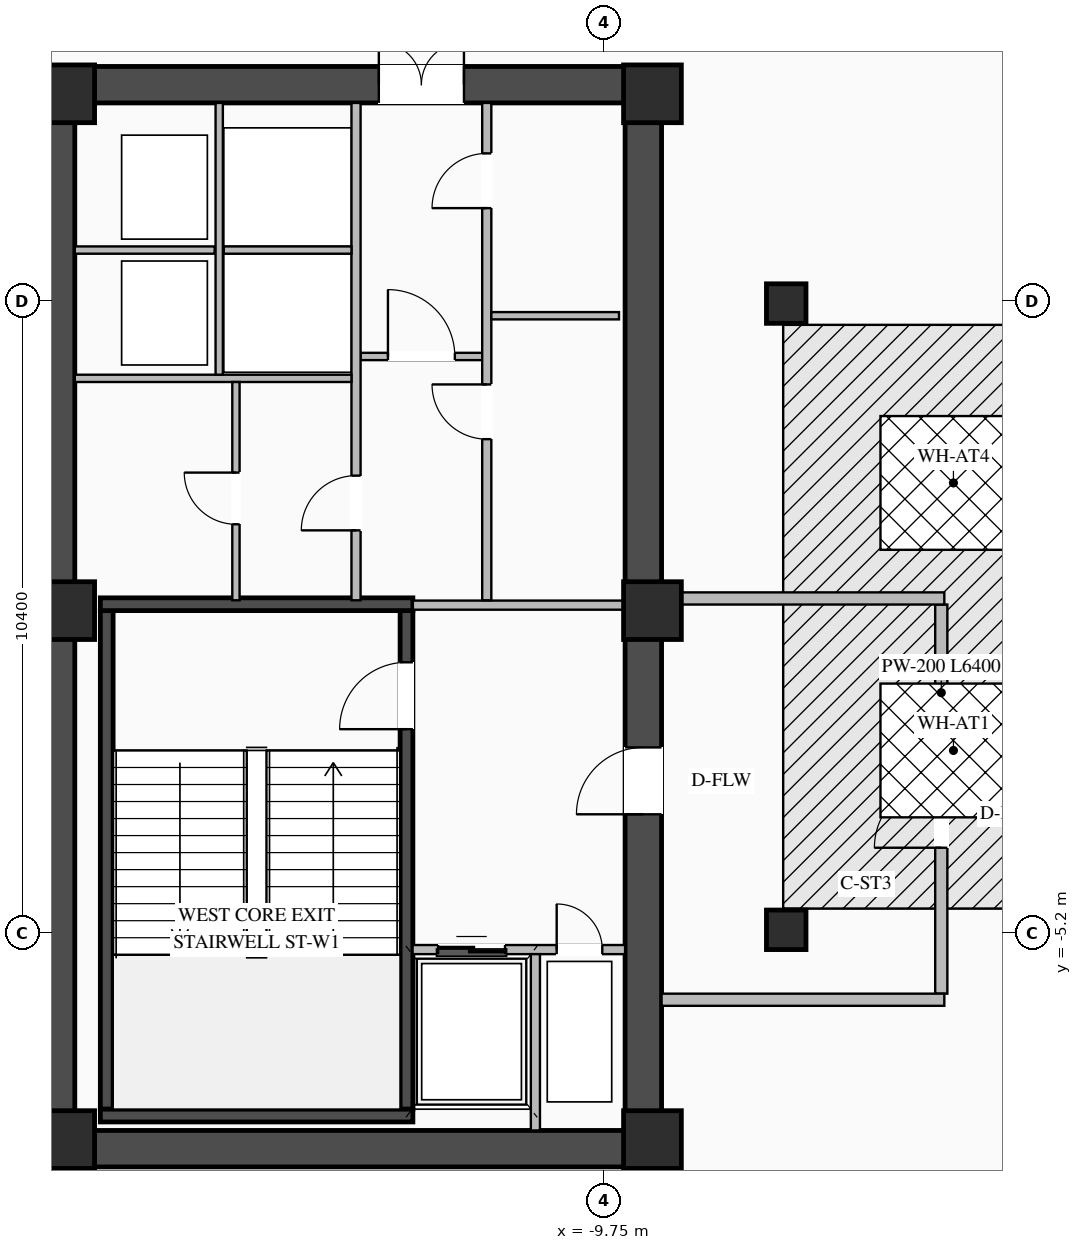
"""IFC4 building model, lengths in metres.
Left out: names, types, materials, properties, quantities, classifications, styles, units other than length and angle.
Written with IfcOpenShell. Run it as: python <this file> out.ifc"""

import sys

from ifc_helpers import new_model, si_unit, direction, frame, frame_2d, origin, origin_2d, place, context, subcontext, project, spatial, rectangle, i_section, extrude, element, fill, save


model = new_model("IFC4")
c1 = context("Model", 3, precision=1e-05, world=origin(), true_north=direction((0.0, 1.0)))
c2 = subcontext(c1, "Body", "Model", "MODEL_VIEW")
j1 = project(units=[si_unit("LENGTHUNIT", "METRE"), si_unit("PLANEANGLEUNIT", "RADIAN")], contexts=[c1])
p1 = place(None, origin())
s1 = spatial("IfcSite", under=j1, at=p1, CompositionType="ELEMENT")
p2 = place(p1, origin())
s2 = spatial("IfcBuilding", under=s1, at=p2, CompositionType="ELEMENT")
p3 = place(p2, frame((0.0, 0.0, 194.9)))
s3 = spatial("IfcBuildingStorey", under=s2, at=p3, CompositionType="ELEMENT", Elevation=194.9)
p4 = place(p3, frame((-19.05, -8.75, 0.0), z_axis=(0.0, 0.0, 1.0), x_axis=(1.0, 0.0, 0.0)))
e1 = element("IfcWall", 1, at=p4, inside=s3, PredefinedType="SHEAR", context=c2, shape_type="SweptSolid", body=[
    extrude(rectangle(XDim=10.25, YDim=0.6, at=frame_2d((5.125, 0.0))), origin(), (0.0, 0.0, 1.0), 4.32),
])
p5 = place(p3, frame((-19.05, 8.75, 0.0), z_axis=(0.0, 0.0, 1.0), x_axis=(1.0, 0.0, 0.0)))
e2 = element("IfcWall", 2, at=p5, inside=s3, PredefinedType="SHEAR", context=c2, shape_type="SweptSolid", body=[
    extrude(rectangle(XDim=10.25, YDim=0.6, at=frame_2d((5.125, 0.0))), origin(), (0.0, 0.0, 1.0), 4.32),
])
p6 = place(p5, frame((5.6, 0.0, 0.0)))
e3 = element("IfcOpeningElement", 3, at=p6, cuts=e2, PredefinedType="OPENING", context=c2, shape_type="SweptSolid", body=[
    extrude(rectangle(XDim=1.4, YDim=2.05, at=frame_2d((0.7, 1.025))), frame((0.0, 0.31, 0.0), z_axis=(0.0, -1.0, 0.0), x_axis=(1.0, 0.0, 0.0)), (0.0, 0.0, 1.0), 0.62),
])
p7 = place(p3, frame((-18.75, -8.45, 0.0), z_axis=(0.0, 0.0, 1.0), x_axis=(0.0, 1.0, 0.0)))
e4 = element("IfcWall", 4, at=p7, inside=s3, PredefinedType="SHEAR", context=c2, shape_type="SweptSolid", body=[
    extrude(rectangle(XDim=16.9, YDim=0.6, at=frame_2d((8.45, 0.0))), origin(), (0.0, 0.0, 1.0), 4.32),
])
p8 = place(p3, frame((-9.1, -8.45, 0.0), z_axis=(0.0, 0.0, 1.0), x_axis=(0.0, 1.0, 0.0)))
e5 = element("IfcWall", 5, at=p8, inside=s3, PredefinedType="SHEAR", context=c2, shape_type="SweptSolid", body=[
    extrude(rectangle(XDim=16.9, YDim=0.6, at=frame_2d((8.45, 0.0))), origin(), (0.0, 0.0, 1.0), 4.32),
])
p9 = place(p8, frame((5.2, 0.0, 0.0)))
e6 = element("IfcOpeningElement", 6, at=p9, cuts=e5, PredefinedType="OPENING", context=c2, shape_type="SweptSolid", body=[
    extrude(rectangle(XDim=1.1, YDim=2.08, at=frame_2d((0.55, 1.04))), frame((0.0, 0.31, 0.0), z_axis=(0.0, -1.0, 0.0), x_axis=(1.0, 0.0, 0.0)), (0.0, 0.0, 1.0), 0.62),
])
p10 = place(p3, frame((-12.995, -8.1, 0.0), z_axis=(0.0, 0.0, 1.0), x_axis=(0.0, 1.0, 0.0)))
e7 = element("IfcWall", 7, at=p10, inside=s3, PredefinedType="SHEAR", context=c2, shape_type="SweptSolid", body=[
    extrude(rectangle(XDim=8.2, YDim=0.21, at=frame_2d((4.1, 0.0))), origin(), (0.0, 0.0, 1.0), 4.32),
])
p11 = place(p10, frame((6.25, 0.0, 0.0)))
e8 = element("IfcOpeningElement", 8, at=p11, cuts=e7, PredefinedType="OPENING", context=c2, shape_type="SweptSolid", body=[
    extrude(rectangle(XDim=1.1, YDim=2.15, at=frame_2d((0.55, 1.075))), frame((0.0, 0.115, 0.0), z_axis=(0.0, -1.0, 0.0), x_axis=(1.0, 0.0, 0.0)), (0.0, 0.0, 1.0), 0.23),
])
p12 = place(p3, frame((-17.925, -8.1, 0.0), z_axis=(0.0, 0.0, 1.0), x_axis=(0.0, 1.0, 0.0)))
e9 = element("IfcWall", 9, at=p12, inside=s3, PredefinedType="SHEAR", context=c2, shape_type="SweptSolid", body=[
    extrude(rectangle(XDim=8.2, YDim=0.21, at=frame_2d((4.1, 0.0))), origin(), (0.0, 0.0, 1.0), 4.32),
])
for number, where, z_axis, x_axis in (
    (10, (-18.03, -8.205, 0.0), (0.0, 0.0, 1.0), (1.0, 0.0, 0.0)),
    (11, (-12.89, 0.205, 0.0), (0.0, 0.0, 1.0), (-1.0, 0.0, 0.0)),
):
    element("IfcWall", number, at=place(p3, frame(where, z_axis=z_axis, x_axis=x_axis)), inside=s3, PredefinedType="SHEAR", context=c2, shape_type="SweptSolid", body=[
        extrude(rectangle(XDim=5.14, YDim=0.21, at=frame_2d((2.57, 0.0))), origin(), (0.0, 0.0, 1.0), 4.32),
    ])
for number, where, z_axis, x_axis in (
    (12, (-8.95, -8.6, 0.0), (0.0, 0.0, 1.0), (1.0, 0.0, 0.0)),
    (13, (-8.95, 0.1, 0.0), (0.0, 0.0, 1.0), (1.0, 0.0, 0.0)),
    (14, (-8.95, 8.6, 0.0), (0.0, 0.0, 1.0), (1.0, 0.0, 0.0)),
    (15, (-18.6, -8.6, 0.0), (0.0, 0.0, 1.0), (1.0, 0.0, 0.0)),
    (16, (-18.6, 0.1, 0.0), (0.0, 0.0, 1.0), (1.0, 0.0, 0.0)),
    (17, (-18.6, 8.6, 0.0), (0.0, 0.0, 1.0), (1.0, 0.0, 0.0)),
):
    element("IfcColumn", number, at=place(p3, frame(where, z_axis=z_axis, x_axis=x_axis)), inside=s3, PredefinedType="COLUMN", context=c2, shape_type="SweptSolid", body=[
        extrude(rectangle(XDim=0.95, YDim=0.95, at=origin_2d()), origin(), (0.0, 0.0, 1.0), 4.6),
    ])
for number, where, z_axis, x_axis in (
    (18, (-6.75, -5.15, 0.0), (0.0, 0.0, 1.0), (1.0, 0.0, 0.0)),
    (19, (-6.75, 5.15, 0.0), (0.0, 0.0, 1.0), (1.0, 0.0, 0.0)),
):
    element("IfcColumn", number, at=place(p3, frame(where, z_axis=z_axis, x_axis=x_axis)), inside=s3, PredefinedType="COLUMN", context=c2, shape_type="SweptSolid", body=[
        extrude(i_section(OverallWidth=0.65, OverallDepth=0.65, WebThickness=0.028, FlangeThickness=0.04, at=origin_2d()), origin(), (0.0, 0.0, 1.0), 4.6),
    ])
p13 = place(p3, frame((-12.895, -5.475, 0.0), z_axis=(0.0, 0.0, 1.0), x_axis=(1.0, 0.0, 0.0)))
e20 = element("IfcWall", 20, at=p13, inside=s3, PredefinedType="STANDARD", context=c2, shape_type="SweptSolid", body=[
    extrude(rectangle(XDim=3.495, YDim=0.15, at=frame_2d((1.748, 0.0))), origin(), (0.0, 0.0, 1.0), 4.3),
])
p14 = place(p13, frame((0.42, 0.0, 0.0)))
e21 = element("IfcOpeningElement", 21, at=p14, cuts=e20, PredefinedType="OPENING", context=c2, shape_type="SweptSolid", body=[
    extrude(rectangle(XDim=1.1, YDim=2.15, at=frame_2d((0.55, 1.075))), frame((0.0, 0.085, 0.0), z_axis=(0.0, -1.0, 0.0), x_axis=(1.0, 0.0, 0.0)), (0.0, 0.0, 1.0), 0.17),
])
p15 = place(p13, frame((2.37, 0.0, 0.0)))
e22 = element("IfcOpeningElement", 22, at=p15, cuts=e20, PredefinedType="OPENING", context=c2, shape_type="SweptSolid", body=[
    extrude(rectangle(XDim=0.75, YDim=2.05, at=frame_2d((0.375, 1.025))), frame((0.0, 0.085, 0.0), z_axis=(0.0, -1.0, 0.0), x_axis=(1.0, 0.0, 0.0)), (0.0, 0.0, 1.0), 0.17),
])
p16 = place(p3, frame((-10.875, -8.45, 0.0), z_axis=(0.0, 0.0, 1.0), x_axis=(0.0, 1.0, 0.0)))
e23 = element("IfcWall", 23, at=p16, inside=s3, PredefinedType="STANDARD", context=c2, shape_type="SweptSolid", body=[
    extrude(rectangle(XDim=2.9, YDim=0.15, at=frame_2d((1.45, 0.0))), origin(), (0.0, 0.0, 1.0), 4.3),
])
p17 = place(p3, frame((-12.89, 0.19, 0.0), z_axis=(0.0, 0.0, 1.0), x_axis=(1.0, 0.0, 0.0)))
e24 = element("IfcWall", 24, at=p17, inside=s3, PredefinedType="STANDARD", context=c2, shape_type="SweptSolid", body=[
    extrude(rectangle(XDim=3.49, YDim=0.15, at=frame_2d((1.745, 0.0))), origin(), (0.0, 0.0, 1.0), 3.695),
])
p18 = place(p3, frame((-13.75, 4.28, 0.0), z_axis=(0.0, 0.0, 1.0), x_axis=(1.0, 0.0, 0.0)))
e25 = element("IfcWall", 25, at=p18, inside=s3, PredefinedType="STANDARD", context=c2, shape_type="SweptSolid", body=[
    extrude(rectangle(XDim=2.0, YDim=0.12, at=frame_2d((1.0, 0.0))), origin(), (0.0, 0.0, 1.0), 4.3),
])
p19 = place(p18, frame((0.45, 0.0, 0.0)))
e26 = element("IfcOpeningElement", 26, at=p19, cuts=e25, PredefinedType="OPENING", context=c2, shape_type="SweptSolid", body=[
    extrude(rectangle(XDim=1.1, YDim=2.1, at=frame_2d((0.55, 1.05))), frame((0.0, 0.07, 0.0), z_axis=(0.0, -1.0, 0.0), x_axis=(1.0, 0.0, 0.0)), (0.0, 0.0, 1.0), 0.14),
])
p20 = place(p3, frame((-11.675, 0.27, 0.0), z_axis=(0.0, 0.0, 1.0), x_axis=(0.0, 1.0, 0.0)))
e27 = element("IfcWall", 27, at=p20, inside=s3, PredefinedType="STANDARD", context=c2, shape_type="SweptSolid", body=[
    extrude(rectangle(XDim=8.18, YDim=0.15, at=frame_2d((4.09, 0.0))), origin(), (0.0, 0.0, 1.0), 4.3),
])
p21 = place(p20, frame((2.65, 0.0, 0.0)))
e28 = element("IfcOpeningElement", 28, at=p21, cuts=e27, PredefinedType="OPENING", context=c2, shape_type="SweptSolid", body=[
    extrude(rectangle(XDim=0.9, YDim=2.05, at=frame_2d((0.45, 1.025))), frame((0.0, 0.085, 0.0), z_axis=(0.0, -1.0, 0.0), x_axis=(1.0, 0.0, 0.0)), (0.0, 0.0, 1.0), 0.17),
])
p22 = place(p20, frame((6.45, 0.0, 0.0)))
e29 = element("IfcOpeningElement", 29, at=p22, cuts=e27, PredefinedType="OPENING", context=c2, shape_type="SweptSolid", body=[
    extrude(rectangle(XDim=0.9, YDim=2.05, at=frame_2d((0.45, 1.025))), frame((0.0, 0.085, 0.0), z_axis=(0.0, -1.0, 0.0), x_axis=(1.0, 0.0, 0.0)), (0.0, 0.0, 1.0), 0.17),
])
p23 = place(p3, frame((-11.6, 4.95, 0.0), z_axis=(0.0, 0.0, 1.0), x_axis=(1.0, 0.0, 0.0)))
e30 = element("IfcWall", 30, at=p23, inside=s3, PredefinedType="STANDARD", context=c2, shape_type="SweptSolid", body=[
    extrude(rectangle(XDim=2.1, YDim=0.12, at=frame_2d((1.05, 0.0))), origin(), (0.0, 0.0, 1.0), 4.3),
])
p24 = place(p3, frame((-13.825, 0.27, 0.0), z_axis=(0.0, 0.0, 1.0), x_axis=(0.0, 1.0, 0.0)))
e31 = element("IfcWall", 31, at=p24, inside=s3, PredefinedType="STANDARD", context=c2, shape_type="SweptSolid", body=[
    extrude(rectangle(XDim=8.18, YDim=0.15, at=frame_2d((4.09, 0.0))), origin(), (0.0, 0.0, 1.0), 4.3),
])
p25 = place(p24, frame((1.15, 0.0, 0.0)))
e32 = element("IfcOpeningElement", 32, at=p25, cuts=e31, PredefinedType="OPENING", context=c2, shape_type="SweptSolid", body=[
    extrude(rectangle(XDim=0.9, YDim=2.05, at=frame_2d((0.45, 1.025))), frame((0.0, 0.085, 0.0), z_axis=(0.0, -1.0, 0.0), x_axis=(1.0, 0.0, 0.0)), (0.0, 0.0, 1.0), 0.17),
])
p26 = place(p3, frame((-18.45, 3.92, 0.0), z_axis=(0.0, 0.0, 1.0), x_axis=(1.0, 0.0, 0.0)))
e33 = element("IfcWall", 33, at=p26, inside=s3, PredefinedType="STANDARD", context=c2, shape_type="SweptSolid", body=[
    extrude(rectangle(XDim=4.55, YDim=0.12, at=frame_2d((2.275, 0.0))), origin(), (0.0, 0.0, 1.0), 4.3),
])
p27 = place(p3, frame((-18.45, 6.03, 0.0), z_axis=(0.0, 0.0, 1.0), x_axis=(1.0, 0.0, 0.0)))
e34 = element("IfcWall", 34, at=p27, inside=s3, PredefinedType="STANDARD", context=c2, shape_type="SweptSolid", body=[
    extrude(rectangle(XDim=2.3, YDim=0.12, at=frame_2d((1.15, 0.0))), origin(), (0.0, 0.0, 1.0), 4.3),
])
p28 = place(p3, frame((-16.075, 3.98, 0.0), z_axis=(0.0, 0.0, 1.0), x_axis=(0.0, 1.0, 0.0)))
e35 = element("IfcWall", 35, at=p28, inside=s3, PredefinedType="STANDARD", context=c2, shape_type="SweptSolid", body=[
    extrude(rectangle(XDim=4.47, YDim=0.12, at=frame_2d((2.235, 0.0))), origin(), (0.0, 0.0, 1.0), 4.3),
])
p29 = place(p3, frame((-16.0, 6.03, 0.0), z_axis=(0.0, 0.0, 1.0), x_axis=(1.0, 0.0, 0.0)))
e36 = element("IfcWall", 36, at=p29, inside=s3, PredefinedType="STANDARD", context=c2, shape_type="SweptSolid", body=[
    extrude(rectangle(XDim=2.1, YDim=0.12, at=frame_2d((1.05, 0.0))), origin(), (0.0, 0.0, 1.0), 4.3),
])
p30 = place(p3, frame((-15.8, 0.27, 0.0), z_axis=(0.0, 0.0, 1.0), x_axis=(0.0, 1.0, 0.0)))
e37 = element("IfcWall", 37, at=p30, inside=s3, PredefinedType="STANDARD", context=c2, shape_type="SweptSolid", body=[
    extrude(rectangle(XDim=3.59, YDim=0.12, at=frame_2d((1.795, 0.0))), origin(), (0.0, 0.0, 1.0), 4.3),
])
p31 = place(p30, frame((1.25, 0.0, 0.0)))
e38 = element("IfcOpeningElement", 38, at=p31, cuts=e37, PredefinedType="OPENING", context=c2, shape_type="SweptSolid", body=[
    extrude(rectangle(XDim=0.85, YDim=2.05, at=frame_2d((0.425, 1.025))), frame((0.0, 0.07, 0.0), z_axis=(0.0, -1.0, 0.0), x_axis=(1.0, 0.0, 0.0)), (0.0, 0.0, 1.0), 0.14),
])
p32 = place(p3, frame((-4.2, -6.2, 0.0), z_axis=(0.0, 0.0, 1.0), x_axis=(0.0, 1.0, 0.0)))
e39 = element("IfcWall", 39, at=p32, inside=s3, PredefinedType="STANDARD", context=c2, shape_type="SweptSolid", body=[
    extrude(rectangle(XDim=6.4, YDim=0.2, at=frame_2d((3.2, 0.0))), origin(), (0.0, 0.0, 1.0), 4.3),
])
p33 = place(p32, frame((2.4, 0.0, 0.0)))
e40 = element("IfcOpeningElement", 40, at=p33, cuts=e39, PredefinedType="OPENING", context=c2, shape_type="SweptSolid", body=[
    extrude(rectangle(XDim=1.1, YDim=2.08, at=frame_2d((0.55, 1.04))), frame((0.0, 0.11, 0.0), z_axis=(0.0, -1.0, 0.0), x_axis=(1.0, 0.0, 0.0)), (0.0, 0.0, 1.0), 0.22),
])
p34 = place(p3, frame((-8.8, -6.3, 0.0), z_axis=(0.0, 0.0, 1.0), x_axis=(1.0, 0.0, 0.0)))
e41 = element("IfcWall", 41, at=p34, inside=s3, PredefinedType="STANDARD", context=c2, shape_type="SweptSolid", body=[
    extrude(rectangle(XDim=4.65, YDim=0.2, at=frame_2d((2.325, 0.0))), origin(), (0.0, 0.0, 1.0), 4.3),
])
p35 = place(p3, frame((-8.8, 0.3, 0.0), z_axis=(0.0, 0.0, 1.0), x_axis=(1.0, 0.0, 0.0)))
e42 = element("IfcWall", 42, at=p35, inside=s3, PredefinedType="STANDARD", context=c2, shape_type="SweptSolid", body=[
    extrude(rectangle(XDim=4.65, YDim=0.2, at=frame_2d((2.325, 0.0))), origin(), (0.0, 0.0, 1.0), 2.795),
])
p36 = place(p3, frame((0.0, 0.0, -0.26)))
p37 = place(p36, frame((-4.0, -2.2, 0.21)))
e43 = element("IfcWindow", 43, at=p37, inside=s3, PartitioningType="SINGLE_PANEL", PredefinedType="SKYLIGHT", context=c2, shape_type="SweptSolid", body=[
    extrude(rectangle(XDim=2.4, YDim=2.2, at=origin_2d()), origin(), (0.0, 0.0, 1.0), 0.05),
])
p38 = place(p36, frame((-4.0, 2.2, 0.21)))
e44 = element("IfcWindow", 44, at=p38, inside=s3, PartitioningType="SINGLE_PANEL", PredefinedType="SKYLIGHT", context=c2, shape_type="SweptSolid", body=[
    extrude(rectangle(XDim=2.4, YDim=2.2, at=origin_2d()), origin(), (0.0, 0.0, 1.0), 0.05),
])
p39 = place(p11, origin())
e45 = element("IfcDoor", 45, at=p39, inside=s3, OperationType="SINGLE_SWING_LEFT", PredefinedType="DOOR", context=c2, shape_type="SweptSolid", body=[
    extrude(rectangle(XDim=1.1, YDim=2.15, at=frame_2d((0.55, 1.075))), frame((0.0, 0.025, 0.0), z_axis=(0.0, -1.0, 0.0), x_axis=(1.0, 0.0, 0.0)), (0.0, 0.0, 1.0), 0.05),
])
fill(e8, e45)
p40 = place(p14, origin())
e46 = element("IfcDoor", 46, at=p40, inside=s3, OperationType="DOUBLE_DOOR_SLIDING", PredefinedType="DOOR", context=c2, shape_type="SweptSolid", body=[
    extrude(rectangle(XDim=1.1, YDim=2.15, at=frame_2d((0.55, 1.075))), frame((0.0, 0.025, 0.0), z_axis=(0.0, -1.0, 0.0), x_axis=(1.0, 0.0, 0.0)), (0.0, 0.0, 1.0), 0.05),
])
fill(e21, e46)
p41 = place(p15, origin())
e47 = element("IfcDoor", 47, at=p41, inside=s3, OperationType="SINGLE_SWING_LEFT", PredefinedType="DOOR", context=c2, shape_type="SweptSolid", body=[
    extrude(rectangle(XDim=0.75, YDim=2.05, at=frame_2d((0.375, 1.025))), frame((0.0, 0.025, 0.0), z_axis=(0.0, -1.0, 0.0), x_axis=(1.0, 0.0, 0.0)), (0.0, 0.0, 1.0), 0.05),
])
fill(e22, e47)
p42 = place(p9, origin())
e48 = element("IfcDoor", 48, at=p42, inside=s3, OperationType="SINGLE_SWING_LEFT", PredefinedType="DOOR", context=c2, shape_type="SweptSolid", body=[
    extrude(rectangle(XDim=1.1, YDim=2.08, at=frame_2d((0.55, 1.04))), frame((0.0, 0.255, 0.0), z_axis=(0.0, -1.0, 0.0), x_axis=(1.0, 0.0, 0.0)), (0.0, 0.0, 1.0), 0.05),
])
fill(e6, e48)
p43 = place(p19, origin())
e49 = element("IfcDoor", 49, at=p43, inside=s3, OperationType="SINGLE_SWING_LEFT", PredefinedType="DOOR", context=c2, shape_type="SweptSolid", body=[
    extrude(rectangle(XDim=1.1, YDim=2.1, at=frame_2d((0.55, 1.05))), frame((0.0, 0.025, 0.0), z_axis=(0.0, -1.0, 0.0), x_axis=(1.0, 0.0, 0.0)), (0.0, 0.0, 1.0), 0.05),
])
fill(e26, e49)
p44 = place(p6, origin())
e50 = element("IfcDoor", 50, at=p44, inside=s3, OperationType="DOUBLE_DOOR_SINGLE_SWING", PredefinedType="DOOR", context=c2, shape_type="SweptSolid", body=[
    extrude(rectangle(XDim=1.4, YDim=2.05, at=frame_2d((0.7, 1.025))), frame((0.0, 0.245, 0.0), z_axis=(0.0, -1.0, 0.0), x_axis=(1.0, 0.0, 0.0)), (0.0, 0.0, 1.0), 0.05),
])
fill(e3, e50)
p45 = place(p21, origin())
e51 = element("IfcDoor", 51, at=p45, inside=s3, OperationType="SINGLE_SWING_RIGHT", PredefinedType="DOOR", context=c2, shape_type="SweptSolid", body=[
    extrude(rectangle(XDim=0.9, YDim=2.05, at=frame_2d((0.45, 1.025))), frame((0.0, 0.025, 0.0), z_axis=(0.0, -1.0, 0.0), x_axis=(1.0, 0.0, 0.0)), (0.0, 0.0, 1.0), 0.05),
])
fill(e28, e51)
p46 = place(p22, origin())
e52 = element("IfcDoor", 52, at=p46, inside=s3, OperationType="SINGLE_SWING_LEFT", PredefinedType="DOOR", context=c2, shape_type="SweptSolid", body=[
    extrude(rectangle(XDim=0.9, YDim=2.05, at=frame_2d((0.45, 1.025))), frame((0.0, 0.025, 0.0), z_axis=(0.0, -1.0, 0.0), x_axis=(1.0, 0.0, 0.0)), (0.0, 0.0, 1.0), 0.05),
])
fill(e29, e52)
p47 = place(p25, origin())
e53 = element("IfcDoor", 53, at=p47, inside=s3, OperationType="SINGLE_SWING_LEFT", PredefinedType="DOOR", context=c2, shape_type="SweptSolid", body=[
    extrude(rectangle(XDim=0.9, YDim=2.05, at=frame_2d((0.45, 1.025))), frame((0.0, 0.025, 0.0), z_axis=(0.0, -1.0, 0.0), x_axis=(1.0, 0.0, 0.0)), (0.0, 0.0, 1.0), 0.05),
])
fill(e32, e53)
p48 = place(p31, origin())
e54 = element("IfcDoor", 54, at=p48, inside=s3, OperationType="SINGLE_SWING_RIGHT", PredefinedType="DOOR", context=c2, shape_type="SweptSolid", body=[
    extrude(rectangle(XDim=0.85, YDim=2.05, at=frame_2d((0.425, 1.025))), frame((0.0, 0.025, 0.0), z_axis=(0.0, -1.0, 0.0), x_axis=(1.0, 0.0, 0.0)), (0.0, 0.0, 1.0), 0.05),
])
fill(e38, e54)
p49 = place(p33, origin())
e55 = element("IfcDoor", 55, at=p49, inside=s3, OperationType="SINGLE_SWING_LEFT", PredefinedType="DOOR", context=c2, shape_type="SweptSolid", body=[
    extrude(rectangle(XDim=1.1, YDim=2.08, at=frame_2d((0.55, 1.04))), frame((0.0, 0.025, 0.0), z_axis=(0.0, -1.0, 0.0), x_axis=(1.0, 0.0, 0.0)), (0.0, 0.0, 1.0), 0.05),
])
fill(e40, e55)
save(model, sys.argv[1])
